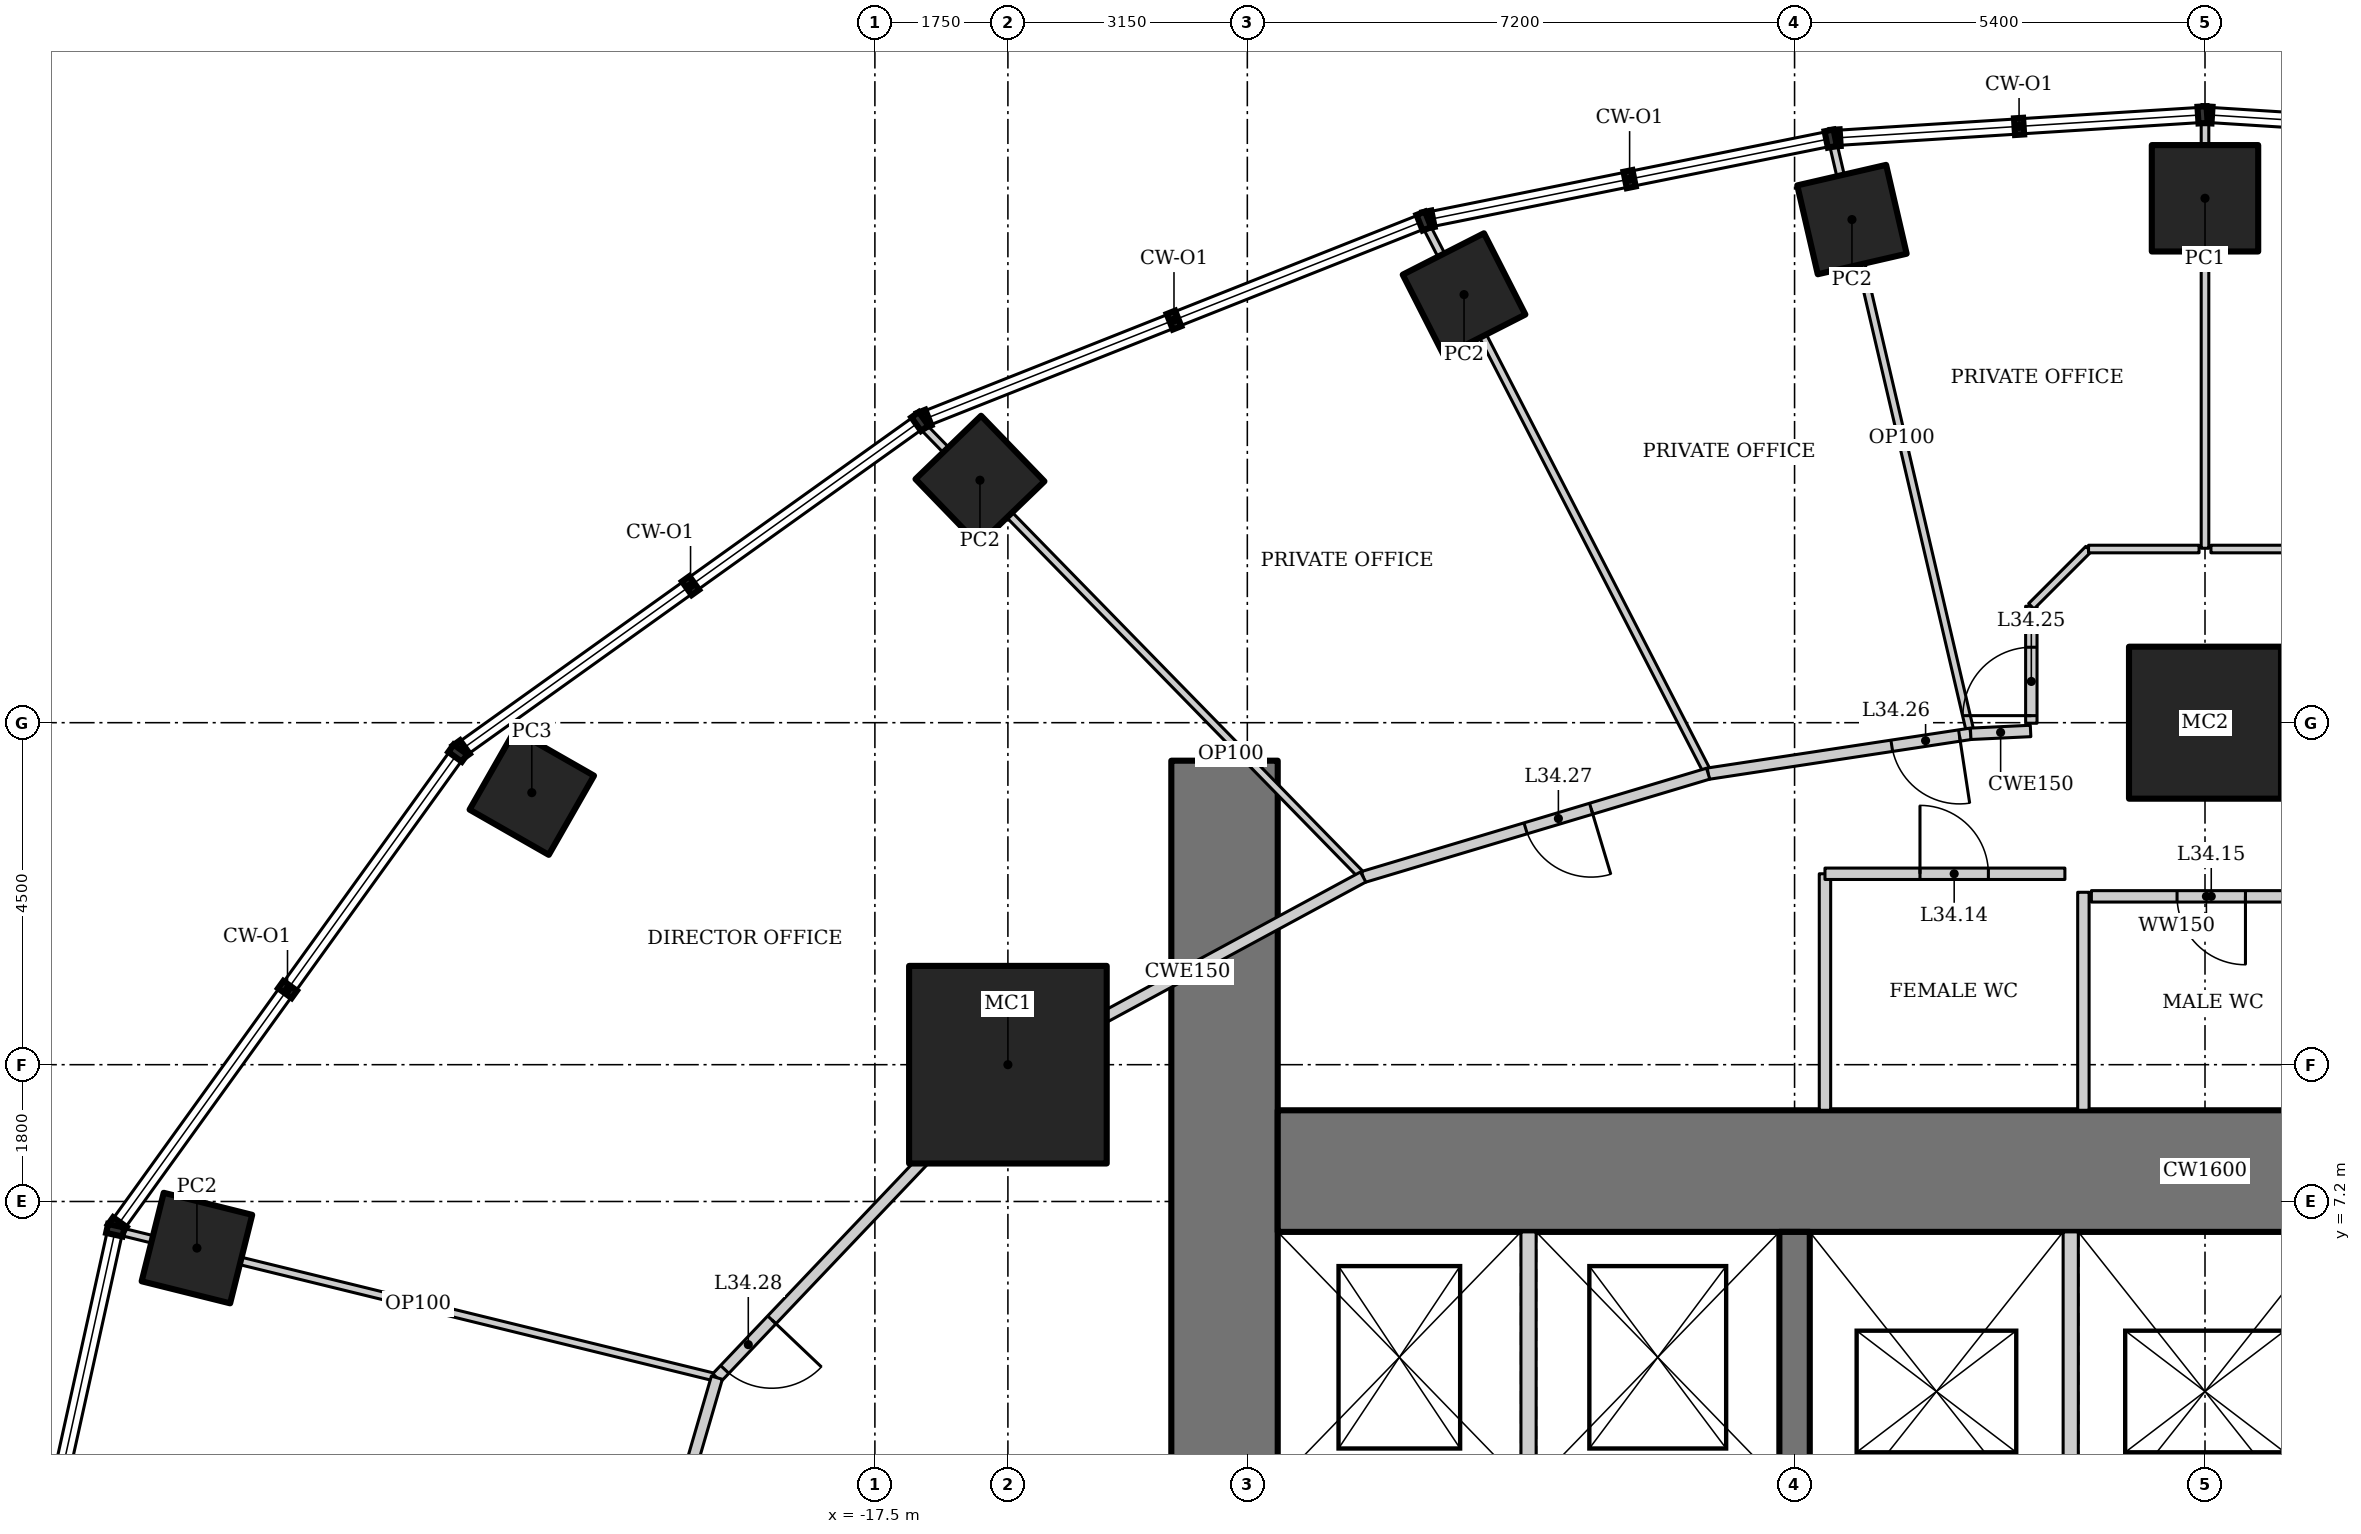
"""IFC4 building model, lengths in metres.
Left out: names, types, materials, properties, quantities, classifications, styles, units other than length and angle.
Written with IfcOpenShell. Run it as: python <this file> out.ifc"""

import sys

from ifc_helpers import new_model, si_unit, direction, frame, frame_2d, origin, origin_2d, place, context, subcontext, project, spatial, rectangle, hollow_rectangle, extrude, element, fill, save


model = new_model("IFC4")
c1 = context("Model", 3, precision=1e-05, world=origin(), true_north=direction((0.0, 1.0)))
c2 = subcontext(c1, "Body", "Model", "MODEL_VIEW")
j1 = project(units=[si_unit("LENGTHUNIT", "METRE"), si_unit("PLANEANGLEUNIT", "RADIAN")], contexts=[c1])
p1 = place(None, origin())
s1 = spatial("IfcSite", under=j1, at=p1, CompositionType="ELEMENT")
p2 = place(p1, origin())
s2 = spatial("IfcBuilding", under=s1, at=p2, CompositionType="ELEMENT")
p3 = place(p2, frame((0.0, 0.0, 146.8)))
s3 = spatial("IfcBuildingStorey", under=s2, at=p3, CompositionType="ELEMENT", Elevation=146.8)
p4 = place(p3, frame((0.0, 13.5, 0.0), z_axis=(0.0, 0.0, 1.0), x_axis=(1.0, 0.0, 0.0)))
e1 = element("IfcColumn", 1, at=p4, inside=s3, PredefinedType="COLUMN", context=c2, shape_type="SweptSolid", body=[
    extrude(hollow_rectangle(XDim=2.0, YDim=2.0, WallThickness=0.17, at=origin_2d()), origin(), (0.0, 0.0, 1.0), 4.2),
])
p5 = place(p3, frame((-15.75, 9.0, 0.0), z_axis=(0.0, 0.0, 1.0), x_axis=(1.0, 0.0, 0.0)))
e2 = element("IfcColumn", 2, at=p5, inside=s3, PredefinedType="COLUMN", context=c2, shape_type="SweptSolid", body=[
    extrude(hollow_rectangle(XDim=2.6, YDim=2.6, WallThickness=0.13, at=origin_2d()), origin(), (0.0, 0.0, 1.0), 4.2),
])
p6 = place(p3, frame((0.0, 20.4, 0.0), z_axis=(0.0, 0.0, 1.0), x_axis=(1.0, 0.0, 0.0)))
e3 = element("IfcColumn", 3, at=p6, inside=s3, PredefinedType="COLUMN", context=c2, shape_type="SweptSolid", body=[
    extrude(hollow_rectangle(XDim=1.4, YDim=1.4, WallThickness=0.1, at=origin_2d()), origin(), (0.0, 0.0, 1.0), 4.2),
])
for number, where, z_axis, x_axis in (
    (4, (-4.645, 20.12, 0.0), (0.0, 0.0, 1.0), (0.974, 0.225, 0.0)),
    (5, (-9.749, 19.133, 0.0), (0.0, 0.0, 1.0), (0.891, 0.454, 0.0)),
    (6, (-16.118, 16.69, 0.0), (0.0, 0.0, 1.0), (0.719, 0.695, 0.0)),
):
    element("IfcColumn", number, at=place(p3, frame(where, z_axis=z_axis, x_axis=x_axis)), inside=s3, PredefinedType="COLUMN", context=c2, shape_type="SweptSolid", body=[
        extrude(hollow_rectangle(XDim=1.2, YDim=1.2, WallThickness=0.1, at=origin_2d()), origin(), (0.0, 0.0, 1.0), 4.2),
    ])
p7 = place(p3, frame((-22.014, 12.579, 0.0), z_axis=(0.0, 0.0, 1.0), x_axis=(0.496139221777, 0.86824298017, 0.0)))
e7 = element("IfcColumn", 7, at=p7, inside=s3, PredefinedType="COLUMN", context=c2, shape_type="SweptSolid", body=[
    extrude(hollow_rectangle(XDim=1.2, YDim=1.2, WallThickness=0.12, at=origin_2d()), origin(), (0.0, 0.0, 1.0), 4.2),
])
p8 = place(p3, frame((-26.42, 6.587, 0.0), z_axis=(0.0, 0.0, 1.0), x_axis=(0.2419218956, 0.970295726276, 0.0)))
e8 = element("IfcColumn", 8, at=p8, inside=s3, PredefinedType="COLUMN", context=c2, shape_type="SweptSolid", body=[
    extrude(hollow_rectangle(XDim=1.2, YDim=1.2, WallThickness=0.1, at=origin_2d()), origin(), (0.0, 0.0, 1.0), 4.2),
])
p9 = place(p3, frame((-12.9, 13.0, 0.0), z_axis=(0.0, 0.0, 1.0), x_axis=(0.0, -1.0, 0.0)))
e9 = element("IfcWall", 9, at=p9, inside=s3, PredefinedType="SHEAR", context=c2, shape_type="SweptSolid", body=[
    extrude(rectangle(XDim=26.0, YDim=1.4, at=frame_2d((13.0, 0.0))), origin(), (0.0, 0.0, 1.0), 4.2),
])
p10 = place(p9, frame((12.1, 0.0, 0.0)))
e10 = element("IfcOpeningElement", 10, at=p10, cuts=e9, PredefinedType="OPENING", context=c2, shape_type="SweptSolid", body=[
    extrude(rectangle(XDim=1.8, YDim=2.1, at=frame_2d((0.9, 1.05))), frame((0.0, 0.71, 0.0), z_axis=(0.0, -1.0, 0.0), x_axis=(1.0, 0.0, 0.0)), (0.0, 0.0, 1.0), 1.42),
])
p11 = place(p3, frame((12.2, 7.6, 0.0), z_axis=(0.0, 0.0, 1.0), x_axis=(-1.0, 0.0, 0.0)))
e11 = element("IfcWall", 11, at=p11, inside=s3, PredefinedType="SHEAR", context=c2, shape_type="SweptSolid", body=[
    extrude(rectangle(XDim=24.4, YDim=1.6, at=frame_2d((12.2, 0.0))), origin(), (0.0, 0.0, 1.0), 4.2),
])
p12 = place(p3, frame((-5.4, 6.8, 0.0), z_axis=(0.0, 0.0, 1.0), x_axis=(0.0, -1.0, 0.0)))
e12 = element("IfcWall", 12, at=p12, inside=s3, PredefinedType="SHEAR", context=c2, shape_type="SweptSolid", body=[
    extrude(rectangle(XDim=13.6, YDim=0.4, at=frame_2d((6.8, 0.0))), origin(), (0.0, 0.0, 1.0), 4.2),
])
p13 = place(p12, frame((5.9, 0.0, 0.0)))
e13 = element("IfcOpeningElement", 13, at=p13, cuts=e12, PredefinedType="OPENING", context=c2, shape_type="SweptSolid", body=[
    extrude(rectangle(XDim=1.8, YDim=2.1, at=frame_2d((0.9, 1.05))), frame((0.0, 0.21, 0.0), z_axis=(0.0, -1.0, 0.0), x_axis=(1.0, 0.0, 0.0)), (0.0, 0.0, 1.0), 0.42),
])
p14 = place(p3, frame((-1.767, 2.6, 0.0), z_axis=(0.0, 0.0, 1.0), x_axis=(0.0, 1.0, 0.0)))
e14 = element("IfcWall", 14, at=p14, inside=s3, PredefinedType="SOLIDWALL", context=c2, shape_type="SweptSolid", body=[
    extrude(rectangle(XDim=4.2, YDim=0.2, at=frame_2d((2.1, 0.0))), origin(), (0.0, 0.0, 1.0), 4.2),
])
p15 = place(p3, frame((-8.9, 3.5, 0.0), z_axis=(0.0, 0.0, 1.0), x_axis=(0.0, 1.0, 0.0)))
e15 = element("IfcWall", 15, at=p15, inside=s3, PredefinedType="SOLIDWALL", context=c2, shape_type="SweptSolid", body=[
    extrude(rectangle(XDim=3.3, YDim=0.2, at=frame_2d((1.65, 0.0))), origin(), (0.0, 0.0, 1.0), 4.2),
])
p16 = place(p3, frame((-4.897, 21.135, 0.0), z_axis=(0.0, 0.0, 1.0), x_axis=(0.227039313577, -0.973885593943, 0.0)))
e16 = element("IfcWall", 16, at=p16, inside=s3, PredefinedType="PARTITIONING", context=c2, shape_type="SweptSolid", body=[
    extrude(rectangle(XDim=7.99, YDim=0.1, at=frame_2d((3.995, 0.0))), origin(), (0.0, 0.0, 1.0), 3.293),
])
p17 = place(p3, frame((-10.253, 20.052, 0.0), z_axis=(0.0, 0.0, 1.0), x_axis=(0.457535449567, -0.889191381194, 0.0)))
e17 = element("IfcWall", 17, at=p17, inside=s3, PredefinedType="PARTITIONING", context=c2, shape_type="SweptSolid", body=[
    extrude(rectangle(XDim=8.123, YDim=0.1, at=frame_2d((4.061, 0.0))), origin(), (0.0, 0.0, 1.0), 3.349),
])
p18 = place(p3, frame((-16.882, 17.414, 0.0), z_axis=(0.0, 0.0, 1.0), x_axis=(0.698758056249, -0.715358077348, 0.0)))
e18 = element("IfcWall", 18, at=p18, inside=s3, PredefinedType="PARTITIONING", context=c2, shape_type="SweptSolid", body=[
    extrude(rectangle(XDim=8.31, YDim=0.1, at=frame_2d((4.155, 0.0))), origin(), (0.0, 0.0, 1.0), 3.321),
])
p19 = place(p3, frame((-27.441, 6.809, 0.0), z_axis=(0.0, 0.0, 1.0), x_axis=(0.971241251223, -0.238097526075, 0.0)))
e19 = element("IfcWall", 19, at=p19, inside=s3, PredefinedType="PARTITIONING", context=c2, shape_type="SweptSolid", body=[
    extrude(rectangle(XDim=8.094, YDim=0.1, at=frame_2d((4.047, 0.0))), origin(), (0.0, 0.0, 1.0), 3.113),
])
p20 = place(p3, frame((-3.083, 13.354, 0.0), z_axis=(0.0, 0.0, 1.0), x_axis=(-0.988668719464, -0.150113833987, 0.0)))
e20 = element("IfcWall", 20, at=p20, inside=s3, PredefinedType="PARTITIONING", context=c2, shape_type="SweptSolid", body=[
    extrude(rectangle(XDim=3.493, YDim=0.15, at=frame_2d((1.747, 0.0))), origin(), (0.0, 0.0, 1.0), 4.05),
])
p21 = place(p20, frame((0.15, 0.0, 0.0)))
e21 = element("IfcOpeningElement", 21, at=p21, cuts=e20, PredefinedType="OPENING", context=c2, shape_type="SweptSolid", body=[
    extrude(rectangle(XDim=0.9, YDim=2.1, at=frame_2d((0.45, 1.05))), frame((0.0, 0.085, 0.0), z_axis=(0.0, -1.0, 0.0), x_axis=(1.0, 0.0, 0.0)), (0.0, 0.0, 1.0), 0.17),
])
p22 = place(p3, frame((-6.537, 12.829, 0.0), z_axis=(0.0, 0.0, 1.0), x_axis=(-0.957933992798, -0.286988615527, 0.0)))
e22 = element("IfcWall", 22, at=p22, inside=s3, PredefinedType="PARTITIONING", context=c2, shape_type="SweptSolid", body=[
    extrude(rectangle(XDim=4.738, YDim=0.15, at=frame_2d((2.369, 0.0))), origin(), (0.0, 0.0, 1.0), 4.05),
])
p23 = place(p22, frame((1.607, 0.0, 0.0)))
e23 = element("IfcOpeningElement", 23, at=p23, cuts=e22, PredefinedType="OPENING", context=c2, shape_type="SweptSolid", body=[
    extrude(rectangle(XDim=0.9, YDim=2.1, at=frame_2d((0.45, 1.05))), frame((0.0, 0.085, 0.0), z_axis=(0.0, -1.0, 0.0), x_axis=(1.0, 0.0, 0.0)), (0.0, 0.0, 1.0), 0.17),
])
p24 = place(p3, frame((-11.076, 11.469, 0.0), z_axis=(0.0, 0.0, 1.0), x_axis=(-0.879436285334, -0.476016617397, 0.0)))
e24 = element("IfcWall", 24, at=p24, inside=s3, PredefinedType="PARTITIONING", context=c2, shape_type="SweptSolid", body=[
    extrude(rectangle(XDim=5.253, YDim=0.15, at=frame_2d((2.626, 0.0))), origin(), (0.0, 0.0, 1.0), 4.05),
])
p25 = place(p3, frame((-15.696, 8.969, 0.0), z_axis=(0.0, 0.0, 1.0), x_axis=(-0.688797257101, -0.72495402517, 0.0)))
e25 = element("IfcWall", 25, at=p25, inside=s3, PredefinedType="PARTITIONING", context=c2, shape_type="SweptSolid", body=[
    extrude(rectangle(XDim=5.638, YDim=0.15, at=frame_2d((2.819, 0.0))), origin(), (0.0, 0.0, 1.0), 4.05),
])
p26 = place(p25, frame((4.588, 0.0, 0.0)))
e26 = element("IfcOpeningElement", 26, at=p26, cuts=e25, PredefinedType="OPENING", context=c2, shape_type="SweptSolid", body=[
    extrude(rectangle(XDim=0.9, YDim=2.1, at=frame_2d((0.45, 1.05))), frame((0.0, 0.085, 0.0), z_axis=(0.0, -1.0, 0.0), x_axis=(1.0, 0.0, 0.0)), (0.0, 0.0, 1.0), 0.17),
])
p27 = place(p3, frame((-19.579, 4.882, 0.0), z_axis=(0.0, 0.0, 1.0), x_axis=(-0.279474430869, -0.960153134917, 0.0)))
e27 = element("IfcWall", 27, at=p27, inside=s3, PredefinedType="PARTITIONING", context=c2, shape_type="SweptSolid", body=[
    extrude(rectangle(XDim=5.084, YDim=0.15, at=frame_2d((2.542, 0.0))), origin(), (0.0, 0.0, 1.0), 4.05),
])
p28 = place(p3, frame((-5.0, 8.4, 0.0), z_axis=(0.0, 0.0, 1.0), x_axis=(0.0, 1.0, 0.0)))
e28 = element("IfcWall", 28, at=p28, inside=s3, PredefinedType="SOLIDWALL", context=c2, shape_type="SweptSolid", body=[
    extrude(rectangle(XDim=3.112, YDim=0.15, at=frame_2d((1.556, 0.0))), origin(), (0.0, 0.0, 1.0), 4.05),
])
p29 = place(p3, frame((-12.9, 13.0, 0.0), z_axis=(0.0, 0.0, 1.0), x_axis=(0.714845300066, 0.699282630253, 0.0)))
e29 = element("IfcWall", 29, at=p29, inside=s3, PredefinedType="PARTITIONING", context=c2, shape_type="SweptSolid", body=[
    extrude(rectangle(XDim=0.235, YDim=0.1, at=frame_2d((0.118, 0.0))), origin(), (0.0, 0.0, 1.0), 4.05),
])
p30 = place(p3, frame((0.0, 21.445, 0.0), z_axis=(0.0, 0.0, 1.0), x_axis=(0.0, -1.0, 0.0)))
e30 = element("IfcWall", 30, at=p30, inside=s3, PredefinedType="PARTITIONING", context=c2, shape_type="SweptSolid", body=[
    extrude(rectangle(XDim=5.65, YDim=0.1, at=frame_2d((2.825, 0.0))), origin(), (0.0, 0.0, 1.0), 3.646),
])
p31 = place(p3, frame((-2.295, 13.391, 0.0), z_axis=(0.0, 0.0, 1.0), x_axis=(-0.998878614804, -0.04734461836, 0.0)))
e31 = element("IfcWall", 31, at=p31, inside=s3, PredefinedType="PARTITIONING", context=c2, shape_type="SweptSolid", body=[
    extrude(rectangle(XDim=0.789, YDim=0.15, at=frame_2d((0.395, 0.0))), origin(), (0.0, 0.0, 1.0), 4.05),
])
p32 = place(p3, frame((-5.0, 11.512, 0.0), z_axis=(0.0, 0.0, 1.0), x_axis=(1.0, 0.0, 0.0)))
e32 = element("IfcWall", 32, at=p32, inside=s3, PredefinedType="SOLIDWALL", context=c2, shape_type="SweptSolid", body=[
    extrude(rectangle(XDim=3.156, YDim=0.15, at=frame_2d((1.578, 0.0))), origin(), (0.0, 0.0, 1.0), 4.05),
])
p33 = place(p32, frame((1.25, 0.0, 0.0)))
e33 = element("IfcOpeningElement", 33, at=p33, cuts=e32, PredefinedType="OPENING", context=c2, shape_type="SweptSolid", body=[
    extrude(rectangle(XDim=0.9, YDim=2.1, at=frame_2d((0.45, 1.05))), frame((0.0, 0.085, 0.0), z_axis=(0.0, -1.0, 0.0), x_axis=(1.0, 0.0, 0.0)), (0.0, 0.0, 1.0), 0.17),
])
p34 = place(p3, frame((-1.6, 8.4, 0.0), z_axis=(0.0, 0.0, 1.0), x_axis=(0.0, 1.0, 0.0)))
e34 = element("IfcWall", 34, at=p34, inside=s3, PredefinedType="SOLIDWALL", context=c2, shape_type="SweptSolid", body=[
    extrude(rectangle(XDim=2.869, YDim=0.15, at=frame_2d((1.434, 0.0))), origin(), (0.0, 0.0, 1.0), 4.05),
])
p35 = place(p3, frame((1.532, 11.215, 0.0), z_axis=(0.0, 0.0, 1.0), x_axis=(-1.0, 0.0, 0.0)))
e35 = element("IfcWall", 35, at=p35, inside=s3, PredefinedType="SOLIDWALL", context=c2, shape_type="SweptSolid", body=[
    extrude(rectangle(XDim=3.027, YDim=0.15, at=frame_2d((1.514, 0.0))), origin(), (0.0, 0.0, 1.0), 4.05),
])
p36 = place(p35, frame((1.0, 0.0, 0.0)))
e36 = element("IfcOpeningElement", 36, at=p36, cuts=e35, PredefinedType="OPENING", context=c2, shape_type="SweptSolid", body=[
    extrude(rectangle(XDim=0.9, YDim=2.1, at=frame_2d((0.45, 1.05))), frame((0.0, 0.085, 0.0), z_axis=(0.0, -1.0, 0.0), x_axis=(1.0, 0.0, 0.0)), (0.0, 0.0, 1.0), 0.17),
])
p37 = place(p3, frame((0.078, 15.785, 0.0), z_axis=(0.0, 0.0, 1.0), x_axis=(1.0, 0.0, 0.0)))
e37 = element("IfcWall", 37, at=p37, inside=s3, PredefinedType="PARTITIONING", context=c2, shape_type="SweptSolid", body=[
    extrude(rectangle(XDim=1.454, YDim=0.1, at=frame_2d((0.727, 0.0))), origin(), (0.0, 0.0, 1.0), 4.05),
])
p38 = place(p3, frame((-2.285, 13.493, 0.0), z_axis=(0.0, 0.0, 1.0), x_axis=(0.0, 1.0, 0.0)))
e38 = element("IfcWall", 38, at=p38, inside=s3, PredefinedType="PARTITIONING", context=c2, shape_type="SweptSolid", body=[
    extrude(rectangle(XDim=1.54, YDim=0.15, at=frame_2d((0.77, 0.0))), origin(), (0.0, 0.0, 1.0), 4.05),
])
p39 = place(p38, frame((0.1, 0.0, 0.0)))
e39 = element("IfcOpeningElement", 39, at=p39, cuts=e38, PredefinedType="OPENING", context=c2, shape_type="SweptSolid", body=[
    extrude(rectangle(XDim=0.9, YDim=2.1, at=frame_2d((0.45, 1.05))), frame((0.0, 0.085, 0.0), z_axis=(0.0, -1.0, 0.0), x_axis=(1.0, 0.0, 0.0)), (0.0, 0.0, 1.0), 0.17),
])
p40 = place(p3, frame((-2.285, 15.032, 0.0), z_axis=(0.0, 0.0, 1.0), x_axis=(0.707106781187, 0.707106781187, 0.0)))
e40 = element("IfcWall", 40, at=p40, inside=s3, PredefinedType="PARTITIONING", context=c2, shape_type="SweptSolid", body=[
    extrude(rectangle(XDim=1.064, YDim=0.1, at=frame_2d((0.532, 0.0))), origin(), (0.0, 0.0, 1.0), 4.05),
])
p41 = place(p3, frame((-1.532, 15.785, 0.0), z_axis=(0.0, 0.0, 1.0), x_axis=(1.0, 0.0, 0.0)))
e41 = element("IfcWall", 41, at=p41, inside=s3, PredefinedType="PARTITIONING", context=c2, shape_type="SweptSolid", body=[
    extrude(rectangle(XDim=1.454, YDim=0.1, at=frame_2d((0.727, 0.0))), origin(), (0.0, 0.0, 1.0), 4.05),
])
p42 = place(p33, origin())
e42 = element("IfcDoor", 42, at=p42, inside=s3, OperationType="SINGLE_SWING_LEFT", PredefinedType="DOOR", context=c2, shape_type="SweptSolid", body=[
    extrude(rectangle(XDim=0.9, YDim=2.1, at=frame_2d((0.45, 1.05))), frame((0.0, 0.025, 0.0), z_axis=(0.0, -1.0, 0.0), x_axis=(1.0, 0.0, 0.0)), (0.0, 0.0, 1.0), 0.05),
])
fill(e33, e42)
p43 = place(p36, origin())
e43 = element("IfcDoor", 43, at=p43, inside=s3, OperationType="SINGLE_SWING_LEFT", PredefinedType="DOOR", context=c2, shape_type="SweptSolid", body=[
    extrude(rectangle(XDim=0.9, YDim=2.1, at=frame_2d((0.45, 1.05))), frame((0.0, 0.025, 0.0), z_axis=(0.0, -1.0, 0.0), x_axis=(1.0, 0.0, 0.0)), (0.0, 0.0, 1.0), 0.05),
])
fill(e36, e43)
p44 = place(p39, origin())
e44 = element("IfcDoor", 44, at=p44, inside=s3, OperationType="SINGLE_SWING_LEFT", PredefinedType="DOOR", context=c2, shape_type="SweptSolid", body=[
    extrude(rectangle(XDim=0.9, YDim=2.1, at=frame_2d((0.45, 1.05))), frame((0.0, 0.025, 0.0), z_axis=(0.0, -1.0, 0.0), x_axis=(1.0, 0.0, 0.0)), (0.0, 0.0, 1.0), 0.05),
])
fill(e39, e44)
p45 = place(p21, origin())
e45 = element("IfcDoor", 45, at=p45, inside=s3, OperationType="SINGLE_SWING_LEFT", PredefinedType="DOOR", context=c2, shape_type="SweptSolid", body=[
    extrude(rectangle(XDim=0.9, YDim=2.1, at=frame_2d((0.45, 1.05))), frame((0.0, 0.025, 0.0), z_axis=(0.0, -1.0, 0.0), x_axis=(1.0, 0.0, 0.0)), (0.0, 0.0, 1.0), 0.05),
])
fill(e21, e45)
p46 = place(p23, origin())
e46 = element("IfcDoor", 46, at=p46, inside=s3, OperationType="SINGLE_SWING_LEFT", PredefinedType="DOOR", context=c2, shape_type="SweptSolid", body=[
    extrude(rectangle(XDim=0.9, YDim=2.1, at=frame_2d((0.45, 1.05))), frame((0.0, 0.025, 0.0), z_axis=(0.0, -1.0, 0.0), x_axis=(1.0, 0.0, 0.0)), (0.0, 0.0, 1.0), 0.05),
])
fill(e23, e46)
p47 = place(p26, origin())
e47 = element("IfcDoor", 47, at=p47, inside=s3, OperationType="SINGLE_SWING_LEFT", PredefinedType="DOOR", context=c2, shape_type="SweptSolid", body=[
    extrude(rectangle(XDim=0.9, YDim=2.1, at=frame_2d((0.45, 1.05))), frame((0.0, 0.025, 0.0), z_axis=(0.0, -1.0, 0.0), x_axis=(1.0, 0.0, 0.0)), (0.0, 0.0, 1.0), 0.05),
])
fill(e26, e47)
save(model, sys.argv[1])
